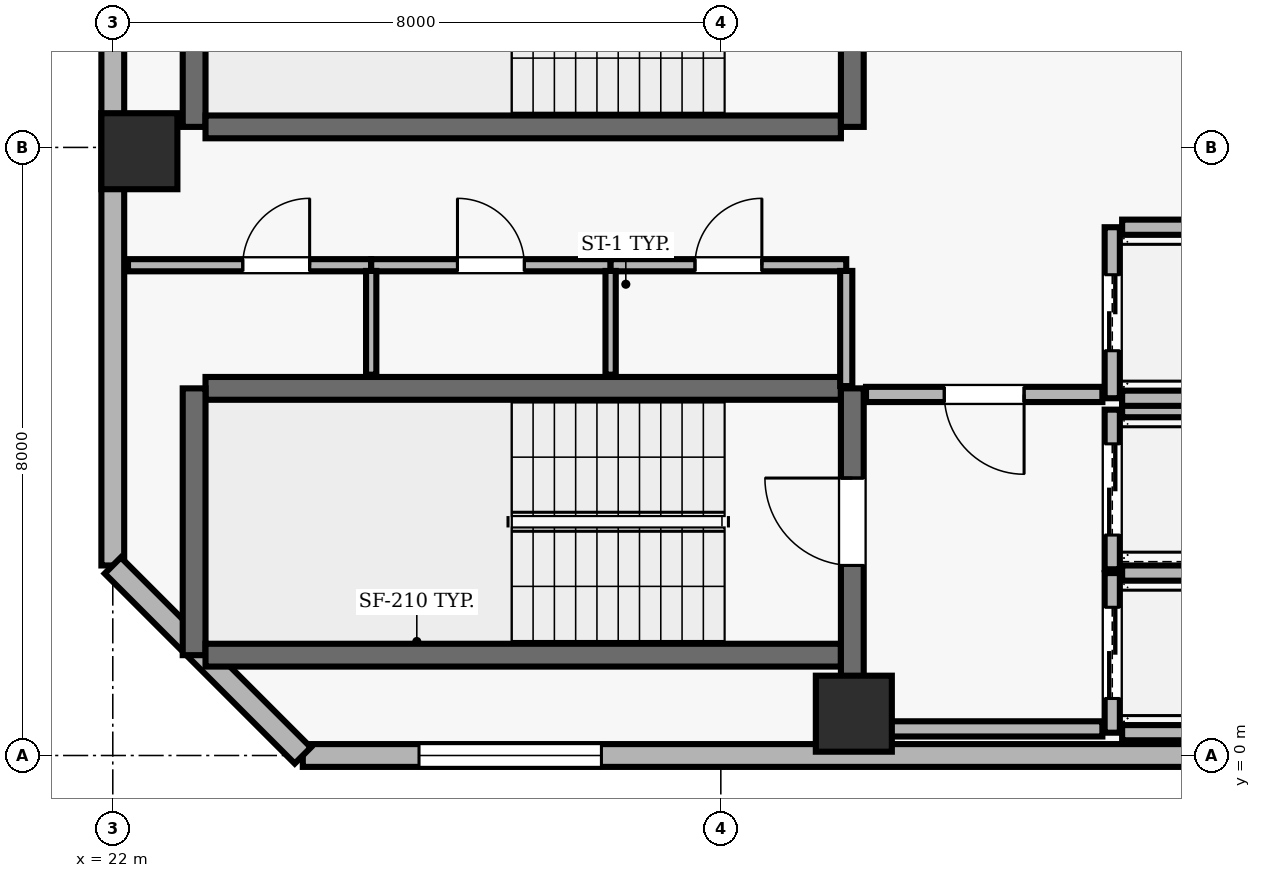
"""IFC4 building model, lengths in metres.
Left out: names, types, materials, properties, quantities, classifications, styles, units other than length and angle.
Written with IfcOpenShell. Run it as: python <this file> out.ifc"""

import sys

from ifc_helpers import new_model, si_unit, direction, frame, frame_2d, origin, origin_2d, place, context, subcontext, project, spatial, rectangle, extrude, element, fill, save


model = new_model("IFC4")
c1 = context("Model", 3, precision=1e-05, world=origin(), true_north=direction((0.0, 1.0)))
c2 = subcontext(c1, "Body", "Model", "MODEL_VIEW")
j1 = project(units=[si_unit("LENGTHUNIT", "METRE"), si_unit("PLANEANGLEUNIT", "RADIAN")], contexts=[c1])
p1 = place(None, origin())
s1 = spatial("IfcSite", under=j1, at=p1, CompositionType="ELEMENT")
p2 = place(p1, origin())
s2 = spatial("IfcBuilding", under=s1, at=p2, CompositionType="ELEMENT")
p3 = place(p2, frame((0.0, 0.0, 191.4)))
s3 = spatial("IfcBuildingStorey", under=s2, at=p3, CompositionType="ELEMENT", Elevation=191.4)
for number, where, z_axis, x_axis in (
    (1, (31.75, 0.55, 0.0), (0.0, 0.0, 1.0), (1.0, 0.0, 0.0)),
    (2, (22.35, 7.95, 0.0), (0.0, 0.0, 1.0), (1.0, 0.0, 0.0)),
):
    element("IfcColumn", number, at=place(p3, frame(where, z_axis=z_axis, x_axis=x_axis)), inside=s3, PredefinedType="COLUMN", context=c2, shape_type="SweptSolid", body=[
        extrude(rectangle(XDim=1.0, YDim=1.0, at=origin_2d()), origin(), (0.0, 0.0, 1.0), 3.9),
    ])
p4 = place(p3, frame((24.5, 0.0, 0.0), z_axis=(0.0, 0.0, 1.0), x_axis=(1.0, 0.0, 0.0)))
e3 = element("IfcWall", 3, at=p4, inside=s3, PredefinedType="SOLIDWALL", context=c2, shape_type="SweptSolid", body=[
    extrude(rectangle(XDim=38.2, YDim=0.3, at=frame_2d((19.1, 0.0))), origin(), (0.0, 0.0, 1.0), 3.69),
])
p5 = place(p4, frame((1.529, 0.0, 0.9)))
e4 = element("IfcOpeningElement", 4, at=p5, cuts=e3, PredefinedType="OPENING", context=c2, shape_type="SweptSolid", body=[
    extrude(rectangle(XDim=2.4, YDim=2.2, at=frame_2d((1.2, 1.1))), frame((0.0, 0.16, 0.0), z_axis=(0.0, -1.0, 0.0), x_axis=(1.0, 0.0, 0.0)), (0.0, 0.0, 1.0), 0.32),
])
p6 = place(p4, frame((17.9, 0.0, 0.9)))
e5 = element("IfcOpeningElement", 5, at=p6, cuts=e3, PredefinedType="OPENING", context=c2, shape_type="SweptSolid", body=[
    extrude(rectangle(XDim=2.4, YDim=2.2, at=frame_2d((1.2, 1.1))), frame((0.0, 0.16, 0.0), z_axis=(0.0, -1.0, 0.0), x_axis=(1.0, 0.0, 0.0)), (0.0, 0.0, 1.0), 0.32),
])
p7 = place(p4, frame((23.357, 0.0, 0.9)))
e6 = element("IfcOpeningElement", 6, at=p7, cuts=e3, PredefinedType="OPENING", context=c2, shape_type="SweptSolid", body=[
    extrude(rectangle(XDim=2.4, YDim=2.2, at=frame_2d((1.2, 1.1))), frame((0.0, 0.16, 0.0), z_axis=(0.0, -1.0, 0.0), x_axis=(1.0, 0.0, 0.0)), (0.0, 0.0, 1.0), 0.32),
])
p8 = place(p4, frame((28.814, 0.0, 0.9)))
e7 = element("IfcOpeningElement", 7, at=p8, cuts=e3, PredefinedType="OPENING", context=c2, shape_type="SweptSolid", body=[
    extrude(rectangle(XDim=2.4, YDim=2.2, at=frame_2d((1.2, 1.1))), frame((0.0, 0.16, 0.0), z_axis=(0.0, -1.0, 0.0), x_axis=(1.0, 0.0, 0.0)), (0.0, 0.0, 1.0), 0.32),
])
p9 = place(p4, frame((34.271, 0.0, 0.9)))
e8 = element("IfcOpeningElement", 8, at=p9, cuts=e3, PredefinedType="OPENING", context=c2, shape_type="SweptSolid", body=[
    extrude(rectangle(XDim=2.4, YDim=2.2, at=frame_2d((1.2, 1.1))), frame((0.0, 0.16, 0.0), z_axis=(0.0, -1.0, 0.0), x_axis=(1.0, 0.0, 0.0)), (0.0, 0.0, 1.0), 0.32),
])
p10 = place(p3, frame((22.0, 40.7, 0.0), z_axis=(0.0, 0.0, 1.0), x_axis=(0.0, -1.0, 0.0)))
e9 = element("IfcWall", 9, at=p10, inside=s3, PredefinedType="SOLIDWALL", context=c2, shape_type="SweptSolid", body=[
    extrude(rectangle(XDim=38.2, YDim=0.3, at=frame_2d((19.1, 0.0))), origin(), (0.0, 0.0, 1.0), 3.69),
])
p11 = place(p10, frame((7.8, 0.0, 0.0)))
e10 = element("IfcOpeningElement", 10, at=p11, cuts=e9, PredefinedType="OPENING", context=c2, shape_type="SweptSolid", body=[
    extrude(rectangle(XDim=1.0, YDim=2.2, at=frame_2d((0.5, 1.1))), frame((0.0, 0.16, 0.0), z_axis=(0.0, -1.0, 0.0), x_axis=(1.0, 0.0, 0.0)), (0.0, 0.0, 1.0), 0.32),
])
p12 = place(p10, frame((11.543, 0.0, 0.9)))
e11 = element("IfcOpeningElement", 11, at=p12, cuts=e9, PredefinedType="OPENING", context=c2, shape_type="SweptSolid", body=[
    extrude(rectangle(XDim=2.4, YDim=2.2, at=frame_2d((1.2, 1.1))), frame((0.0, 0.16, 0.0), z_axis=(0.0, -1.0, 0.0), x_axis=(1.0, 0.0, 0.0)), (0.0, 0.0, 1.0), 0.32),
])
p13 = place(p10, frame((18.35, 0.0, 0.9)))
e12 = element("IfcOpeningElement", 12, at=p13, cuts=e9, PredefinedType="OPENING", context=c2, shape_type="SweptSolid", body=[
    extrude(rectangle(XDim=2.4, YDim=2.2, at=frame_2d((1.2, 1.1))), frame((0.0, 0.16, 0.0), z_axis=(0.0, -1.0, 0.0), x_axis=(1.0, 0.0, 0.0)), (0.0, 0.0, 1.0), 0.32),
])
p14 = place(p10, frame((22.907, 0.0, 0.9)))
e13 = element("IfcOpeningElement", 13, at=p14, cuts=e9, PredefinedType="OPENING", context=c2, shape_type="SweptSolid", body=[
    extrude(rectangle(XDim=2.4, YDim=2.2, at=frame_2d((1.2, 1.1))), frame((0.0, 0.16, 0.0), z_axis=(0.0, -1.0, 0.0), x_axis=(1.0, 0.0, 0.0)), (0.0, 0.0, 1.0), 0.32),
])
p15 = place(p10, frame((28.814, 0.0, 0.9)))
e14 = element("IfcOpeningElement", 14, at=p15, cuts=e9, PredefinedType="OPENING", context=c2, shape_type="SweptSolid", body=[
    extrude(rectangle(XDim=2.4, YDim=2.2, at=frame_2d((1.2, 1.1))), frame((0.0, 0.16, 0.0), z_axis=(0.0, -1.0, 0.0), x_axis=(1.0, 0.0, 0.0)), (0.0, 0.0, 1.0), 0.32),
])
p16 = place(p3, frame((22.0, 2.5, 0.0), z_axis=(0.0, 0.0, 1.0), x_axis=(0.707106781187, -0.707106781187, 0.0)))
e15 = element("IfcWall", 15, at=p16, inside=s3, PredefinedType="SOLIDWALL", context=c2, shape_type="SweptSolid", body=[
    extrude(rectangle(XDim=3.536, YDim=0.3, at=frame_2d((1.768, 0.0))), origin(), (0.0, 0.0, 1.0), 3.69),
])
p17 = place(p3, frame((31.58, 4.83, 0.0), z_axis=(0.0, 0.0, 1.0), x_axis=(-1.0, 0.0, 0.0)))
e16 = element("IfcWall", 16, at=p17, inside=s3, PredefinedType="SHEAR", context=c2, shape_type="SweptSolid", body=[
    extrude(rectangle(XDim=8.36, YDim=0.3, at=frame_2d((4.18, 0.0))), origin(), (0.0, 0.0, 1.0), 3.69),
])
p18 = place(p3, frame((23.07, 4.83, 0.0), z_axis=(0.0, 0.0, 1.0), x_axis=(0.0, -1.0, 0.0)))
e17 = element("IfcWall", 17, at=p18, inside=s3, PredefinedType="SHEAR", context=c2, shape_type="SweptSolid", body=[
    extrude(rectangle(XDim=3.51, YDim=0.3, at=frame_2d((1.755, 0.0))), origin(), (0.0, 0.0, 1.0), 3.69),
])
p19 = place(p3, frame((23.22, 1.32, 0.0), z_axis=(0.0, 0.0, 1.0), x_axis=(1.0, 0.0, 0.0)))
e18 = element("IfcWall", 18, at=p19, inside=s3, PredefinedType="SHEAR", context=c2, shape_type="SweptSolid", body=[
    extrude(rectangle(XDim=8.36, YDim=0.3, at=frame_2d((4.18, 0.0))), origin(), (0.0, 0.0, 1.0), 3.69),
])
p20 = place(p3, frame((31.73, 0.96, 0.0), z_axis=(0.0, 0.0, 1.0), x_axis=(0.0, 1.0, 0.0)))
e19 = element("IfcWall", 19, at=p20, inside=s3, PredefinedType="SHEAR", context=c2, shape_type="SweptSolid", body=[
    extrude(rectangle(XDim=3.87, YDim=0.3, at=frame_2d((1.935, 0.0))), origin(), (0.0, 0.0, 1.0), 3.69),
])
p21 = place(p20, frame((1.54, 0.0, 0.0)))
e20 = element("IfcOpeningElement", 20, at=p21, cuts=e19, PredefinedType="OPENING", context=c2, shape_type="SweptSolid", body=[
    extrude(rectangle(XDim=1.15, YDim=2.15, at=frame_2d((0.575, 1.075))), frame((0.0, 0.16, 0.0), z_axis=(0.0, -1.0, 0.0), x_axis=(1.0, 0.0, 0.0)), (0.0, 0.0, 1.0), 0.32),
])
p22 = place(p3, frame((23.07, 11.78, 0.0), z_axis=(0.0, 0.0, 1.0), x_axis=(0.0, -1.0, 0.0)))
e21 = element("IfcWall", 21, at=p22, inside=s3, PredefinedType="SHEAR", context=c2, shape_type="SweptSolid", body=[
    extrude(rectangle(XDim=3.51, YDim=0.3, at=frame_2d((1.755, 0.0))), origin(), (0.0, 0.0, 1.0), 3.69),
])
p23 = place(p3, frame((23.22, 8.27, 0.0), z_axis=(0.0, 0.0, 1.0), x_axis=(1.0, 0.0, 0.0)))
e22 = element("IfcWall", 22, at=p23, inside=s3, PredefinedType="SHEAR", context=c2, shape_type="SweptSolid", body=[
    extrude(rectangle(XDim=8.36, YDim=0.3, at=frame_2d((4.18, 0.0))), origin(), (0.0, 0.0, 1.0), 3.69),
])
p24 = place(p3, frame((31.73, 8.27, 0.0), z_axis=(0.0, 0.0, 1.0), x_axis=(0.0, 1.0, 0.0)))
e23 = element("IfcWall", 23, at=p24, inside=s3, PredefinedType="SHEAR", context=c2, shape_type="SweptSolid", body=[
    extrude(rectangle(XDim=3.51, YDim=0.3, at=frame_2d((1.755, 0.0))), origin(), (0.0, 0.0, 1.0), 3.69),
])
p25 = place(p24, frame((1.18, 0.0, 0.0)))
e24 = element("IfcOpeningElement", 24, at=p25, cuts=e23, PredefinedType="OPENING", context=c2, shape_type="SweptSolid", body=[
    extrude(rectangle(XDim=1.15, YDim=2.15, at=frame_2d((0.575, 1.075))), frame((0.0, 0.16, 0.0), z_axis=(0.0, -1.0, 0.0), x_axis=(1.0, 0.0, 0.0)), (0.0, 0.0, 1.0), 0.32),
])
p26 = place(p3, frame((35.15, 2.4, 0.0), z_axis=(0.0, 0.0, 1.0), x_axis=(0.0, -1.0, 0.0)))
e25 = element("IfcWall", 25, at=p26, inside=s3, PredefinedType="SOLIDWALL", context=c2, shape_type="SweptSolid", body=[
    extrude(rectangle(XDim=2.1, YDim=0.2, at=frame_2d((1.05, 0.0))), origin(), (0.0, 0.0, 1.0), 3.69),
])
p27 = place(p26, frame((0.45, 0.0, 0.0)))
e26 = element("IfcOpeningElement", 26, at=p27, cuts=e25, PredefinedType="OPENING", context=c2, shape_type="SweptSolid", body=[
    extrude(rectangle(XDim=1.2, YDim=2.15, at=frame_2d((0.6, 1.075))), frame((0.0, 0.11, 0.0), z_axis=(0.0, -1.0, 0.0), x_axis=(1.0, 0.0, 0.0)), (0.0, 0.0, 1.0), 0.22),
])
for number, where, z_axis, x_axis in (
    (27, (35.28, 0.3, 0.0), (0.0, 0.0, 1.0), (1.0, 0.0, 0.0)),
    (28, (37.42, 2.4, 0.0), (0.0, 0.0, 1.0), (-1.0, 0.0, 0.0)),
):
    element("IfcWall", number, at=place(p3, frame(where, z_axis=z_axis, x_axis=x_axis)), inside=s3, PredefinedType="SOLIDWALL", context=c2, shape_type="SweptSolid", body=[
        extrude(rectangle(XDim=2.14, YDim=0.2, at=frame_2d((1.07, 0.0))), origin(), (0.0, 0.0, 1.0), 3.69),
    ])
p28 = place(p3, frame((35.15, 4.55, 0.0), z_axis=(0.0, 0.0, 1.0), x_axis=(0.0, -1.0, 0.0)))
e29 = element("IfcWall", 29, at=p28, inside=s3, PredefinedType="SOLIDWALL", context=c2, shape_type="SweptSolid", body=[
    extrude(rectangle(XDim=2.1, YDim=0.2, at=frame_2d((1.05, 0.0))), origin(), (0.0, 0.0, 1.0), 3.69),
])
p29 = place(p28, frame((0.45, 0.0, 0.0)))
e30 = element("IfcOpeningElement", 30, at=p29, cuts=e29, PredefinedType="OPENING", context=c2, shape_type="SweptSolid", body=[
    extrude(rectangle(XDim=1.2, YDim=2.15, at=frame_2d((0.6, 1.075))), frame((0.0, 0.11, 0.0), z_axis=(0.0, -1.0, 0.0), x_axis=(1.0, 0.0, 0.0)), (0.0, 0.0, 1.0), 0.22),
])
p30 = place(p3, frame((37.42, 4.55, 0.0), z_axis=(0.0, 0.0, 1.0), x_axis=(-1.0, 0.0, 0.0)))
e31 = element("IfcWall", 31, at=p30, inside=s3, PredefinedType="SOLIDWALL", context=c2, shape_type="SweptSolid", body=[
    extrude(rectangle(XDim=2.14, YDim=0.2, at=frame_2d((1.07, 0.0))), origin(), (0.0, 0.0, 1.0), 3.69),
])
p31 = place(p3, frame((35.15, 6.95, 0.0), z_axis=(0.0, 0.0, 1.0), x_axis=(0.0, -1.0, 0.0)))
e32 = element("IfcWall", 32, at=p31, inside=s3, PredefinedType="SOLIDWALL", context=c2, shape_type="SweptSolid", body=[
    extrude(rectangle(XDim=2.25, YDim=0.2, at=frame_2d((1.125, 0.0))), origin(), (0.0, 0.0, 1.0), 3.69),
])
p32 = place(p31, frame((0.625, 0.0, 0.0)))
e33 = element("IfcOpeningElement", 33, at=p32, cuts=e32, PredefinedType="OPENING", context=c2, shape_type="SweptSolid", body=[
    extrude(rectangle(XDim=1.0, YDim=2.1, at=frame_2d((0.5, 1.05))), frame((0.0, 0.11, 0.0), z_axis=(0.0, -1.0, 0.0), x_axis=(1.0, 0.0, 0.0)), (0.0, 0.0, 1.0), 0.22),
])
for number, where, z_axis, x_axis in (
    (34, (35.28, 4.7, 0.0), (0.0, 0.0, 1.0), (1.0, 0.0, 0.0)),
    (35, (37.42, 6.95, 0.0), (0.0, 0.0, 1.0), (-1.0, 0.0, 0.0)),
):
    element("IfcWall", number, at=place(p3, frame(where, z_axis=z_axis, x_axis=x_axis)), inside=s3, PredefinedType="SOLIDWALL", context=c2, shape_type="SweptSolid", body=[
        extrude(rectangle(XDim=2.14, YDim=0.2, at=frame_2d((1.07, 0.0))), origin(), (0.0, 0.0, 1.0), 3.69),
    ])
p33 = place(p3, frame((22.2, 6.45, 0.0), z_axis=(0.0, 0.0, 1.0), x_axis=(1.0, 0.0, 0.0)))
e36 = element("IfcWall", 36, at=p33, inside=s3, PredefinedType="PARTITIONING", context=c2, shape_type="SweptSolid", body=[
    extrude(rectangle(XDim=3.2, YDim=0.16, at=frame_2d((1.6, 0.0))), origin(), (0.0, 0.0, 1.0), 3.69),
])
p34 = place(p33, frame((1.51, 0.0, 0.0)))
e37 = element("IfcOpeningElement", 37, at=p34, cuts=e36, PredefinedType="OPENING", context=c2, shape_type="SweptSolid", body=[
    extrude(rectangle(XDim=0.88, YDim=2.1, at=frame_2d((0.44, 1.05))), frame((0.0, 0.09, 0.0), z_axis=(0.0, -1.0, 0.0), x_axis=(1.0, 0.0, 0.0)), (0.0, 0.0, 1.0), 0.18),
])
p35 = place(p3, frame((25.4, 6.45, 0.0), z_axis=(0.0, 0.0, 1.0), x_axis=(1.0, 0.0, 0.0)))
e38 = element("IfcWall", 38, at=p35, inside=s3, PredefinedType="PARTITIONING", context=c2, shape_type="SweptSolid", body=[
    extrude(rectangle(XDim=3.15, YDim=0.16, at=frame_2d((1.575, 0.0))), origin(), (0.0, 0.0, 1.0), 3.69),
])
p36 = place(p35, frame((1.135, 0.0, 0.0)))
e39 = element("IfcOpeningElement", 39, at=p36, cuts=e38, PredefinedType="OPENING", context=c2, shape_type="SweptSolid", body=[
    extrude(rectangle(XDim=0.88, YDim=2.1, at=frame_2d((0.44, 1.05))), frame((0.0, 0.09, 0.0), z_axis=(0.0, -1.0, 0.0), x_axis=(1.0, 0.0, 0.0)), (0.0, 0.0, 1.0), 0.18),
])
p37 = place(p3, frame((28.55, 6.45, 0.0), z_axis=(0.0, 0.0, 1.0), x_axis=(1.0, 0.0, 0.0)))
e40 = element("IfcWall", 40, at=p37, inside=s3, PredefinedType="PARTITIONING", context=c2, shape_type="SweptSolid", body=[
    extrude(rectangle(XDim=3.1, YDim=0.16, at=frame_2d((1.55, 0.0))), origin(), (0.0, 0.0, 1.0), 3.69),
])
p38 = place(p37, frame((1.11, 0.0, 0.0)))
e41 = element("IfcOpeningElement", 41, at=p38, cuts=e40, PredefinedType="OPENING", context=c2, shape_type="SweptSolid", body=[
    extrude(rectangle(XDim=0.88, YDim=2.1, at=frame_2d((0.44, 1.05))), frame((0.0, 0.09, 0.0), z_axis=(0.0, -1.0, 0.0), x_axis=(1.0, 0.0, 0.0)), (0.0, 0.0, 1.0), 0.18),
])
p39 = place(p3, frame((31.65, 0.35, 0.0), z_axis=(0.0, 0.0, 1.0), x_axis=(1.0, 0.0, 0.0)))
e42 = element("IfcWall", 42, at=p39, inside=s3, PredefinedType="SOLIDWALL", context=c2, shape_type="SweptSolid", body=[
    extrude(rectangle(XDim=3.37, YDim=0.2, at=frame_2d((1.685, 0.0))), origin(), (0.0, 0.0, 1.0), 3.69),
])
p40 = place(p3, frame((35.02, 4.75, 0.0), z_axis=(0.0, 0.0, 1.0), x_axis=(-1.0, 0.0, 0.0)))
e43 = element("IfcWall", 43, at=p40, inside=s3, PredefinedType="SOLIDWALL", context=c2, shape_type="SweptSolid", body=[
    extrude(rectangle(XDim=3.11, YDim=0.2, at=frame_2d((1.555, 0.0))), origin(), (0.0, 0.0, 1.0), 3.69),
])
p41 = place(p40, frame((1.03, 0.0, 0.0)))
e44 = element("IfcOpeningElement", 44, at=p41, cuts=e43, PredefinedType="OPENING", context=c2, shape_type="SweptSolid", body=[
    extrude(rectangle(XDim=1.05, YDim=2.15, at=frame_2d((0.525, 1.075))), frame((0.0, 0.11, 0.0), z_axis=(0.0, -1.0, 0.0), x_axis=(1.0, 0.0, 0.0)), (0.0, 0.0, 1.0), 0.22),
])
for number, where, z_axis, x_axis in (
    (45, (25.4, 5.01, 0.0), (0.0, 0.0, 1.0), (0.0, 1.0, 0.0)),
    (46, (28.55, 5.01, 0.0), (0.0, 0.0, 1.0), (0.0, 1.0, 0.0)),
):
    element("IfcWall", number, at=place(p3, frame(where, z_axis=z_axis, x_axis=x_axis)), inside=s3, PredefinedType="PARTITIONING", context=c2, shape_type="SweptSolid", body=[
        extrude(rectangle(XDim=1.365, YDim=0.135, at=frame_2d((0.683, 0.0))), origin(), (0.0, 0.0, 1.0), 3.69),
    ])
p42 = place(p3, frame((31.65, 4.86, 0.0), z_axis=(0.0, 0.0, 1.0), x_axis=(0.0, 1.0, 0.0)))
e47 = element("IfcWall", 47, at=p42, inside=s3, PredefinedType="PARTITIONING", context=c2, shape_type="SweptSolid", body=[
    extrude(rectangle(XDim=1.515, YDim=0.16, at=frame_2d((0.757, 0.0))), origin(), (0.0, 0.0, 1.0), 3.69),
])
p43 = place(p5, origin())
e48 = element("IfcWindow", 48, at=p43, inside=s3, PartitioningType="SINGLE_PANEL", PredefinedType="WINDOW", context=c2, shape_type="SweptSolid", body=[
    extrude(rectangle(XDim=2.4, YDim=2.2, at=frame_2d((1.2, 1.1))), frame((0.0, 0.03, 0.0), z_axis=(0.0, -1.0, 0.0), x_axis=(1.0, 0.0, 0.0)), (0.0, 0.0, 1.0), 0.06),
])
fill(e4, e48)
p44 = place(p21, origin())
e49 = element("IfcDoor", 49, at=p44, inside=s3, OperationType="SINGLE_SWING_RIGHT", PredefinedType="DOOR", context=c2, shape_type="SweptSolid", body=[
    extrude(rectangle(XDim=1.15, YDim=2.15, at=frame_2d((0.575, 1.075))), frame((0.0, 0.025, 0.0), z_axis=(0.0, -1.0, 0.0), x_axis=(1.0, 0.0, 0.0)), (0.0, 0.0, 1.0), 0.05),
])
fill(e20, e49)
p45 = place(p27, origin())
e50 = element("IfcDoor", 50, at=p45, inside=s3, OperationType="DOUBLE_DOOR_SLIDING", PredefinedType="DOOR", context=c2, shape_type="SweptSolid", body=[
    extrude(rectangle(XDim=1.2, YDim=2.15, at=frame_2d((0.6, 1.075))), frame((0.0, 0.025, 0.0), z_axis=(0.0, -1.0, 0.0), x_axis=(1.0, 0.0, 0.0)), (0.0, 0.0, 1.0), 0.05),
])
fill(e26, e50)
p46 = place(p29, origin())
e51 = element("IfcDoor", 51, at=p46, inside=s3, OperationType="DOUBLE_DOOR_SLIDING", PredefinedType="DOOR", context=c2, shape_type="SweptSolid", body=[
    extrude(rectangle(XDim=1.2, YDim=2.15, at=frame_2d((0.6, 1.075))), frame((0.0, 0.025, 0.0), z_axis=(0.0, -1.0, 0.0), x_axis=(1.0, 0.0, 0.0)), (0.0, 0.0, 1.0), 0.05),
])
fill(e30, e51)
p47 = place(p32, origin())
e52 = element("IfcDoor", 52, at=p47, inside=s3, OperationType="DOUBLE_DOOR_SLIDING", PredefinedType="DOOR", context=c2, shape_type="SweptSolid", body=[
    extrude(rectangle(XDim=1.0, YDim=2.1, at=frame_2d((0.5, 1.05))), frame((0.0, 0.025, 0.0), z_axis=(0.0, -1.0, 0.0), x_axis=(1.0, 0.0, 0.0)), (0.0, 0.0, 1.0), 0.05),
])
fill(e33, e52)
p48 = place(p41, origin())
e53 = element("IfcDoor", 53, at=p48, inside=s3, OperationType="SINGLE_SWING_LEFT", PredefinedType="DOOR", context=c2, shape_type="SweptSolid", body=[
    extrude(rectangle(XDim=1.05, YDim=2.15, at=frame_2d((0.525, 1.075))), frame((0.0, 0.025, 0.0), z_axis=(0.0, -1.0, 0.0), x_axis=(1.0, 0.0, 0.0)), (0.0, 0.0, 1.0), 0.05),
])
fill(e44, e53)
p49 = place(p34, origin())
e54 = element("IfcDoor", 54, at=p49, inside=s3, OperationType="SINGLE_SWING_RIGHT", PredefinedType="DOOR", context=c2, shape_type="SweptSolid", body=[
    extrude(rectangle(XDim=0.88, YDim=2.1, at=frame_2d((0.44, 1.05))), frame((0.0, 0.025, 0.0), z_axis=(0.0, -1.0, 0.0), x_axis=(1.0, 0.0, 0.0)), (0.0, 0.0, 1.0), 0.05),
])
fill(e37, e54)
p50 = place(p36, origin())
e55 = element("IfcDoor", 55, at=p50, inside=s3, OperationType="SINGLE_SWING_LEFT", PredefinedType="DOOR", context=c2, shape_type="SweptSolid", body=[
    extrude(rectangle(XDim=0.88, YDim=2.1, at=frame_2d((0.44, 1.05))), frame((0.0, 0.025, 0.0), z_axis=(0.0, -1.0, 0.0), x_axis=(1.0, 0.0, 0.0)), (0.0, 0.0, 1.0), 0.05),
])
fill(e39, e55)
p51 = place(p38, origin())
e56 = element("IfcDoor", 56, at=p51, inside=s3, OperationType="SINGLE_SWING_RIGHT", PredefinedType="DOOR", context=c2, shape_type="SweptSolid", body=[
    extrude(rectangle(XDim=0.88, YDim=2.1, at=frame_2d((0.44, 1.05))), frame((0.0, 0.025, 0.0), z_axis=(0.0, -1.0, 0.0), x_axis=(1.0, 0.0, 0.0)), (0.0, 0.0, 1.0), 0.05),
])
fill(e41, e56)
save(model, sys.argv[1])
